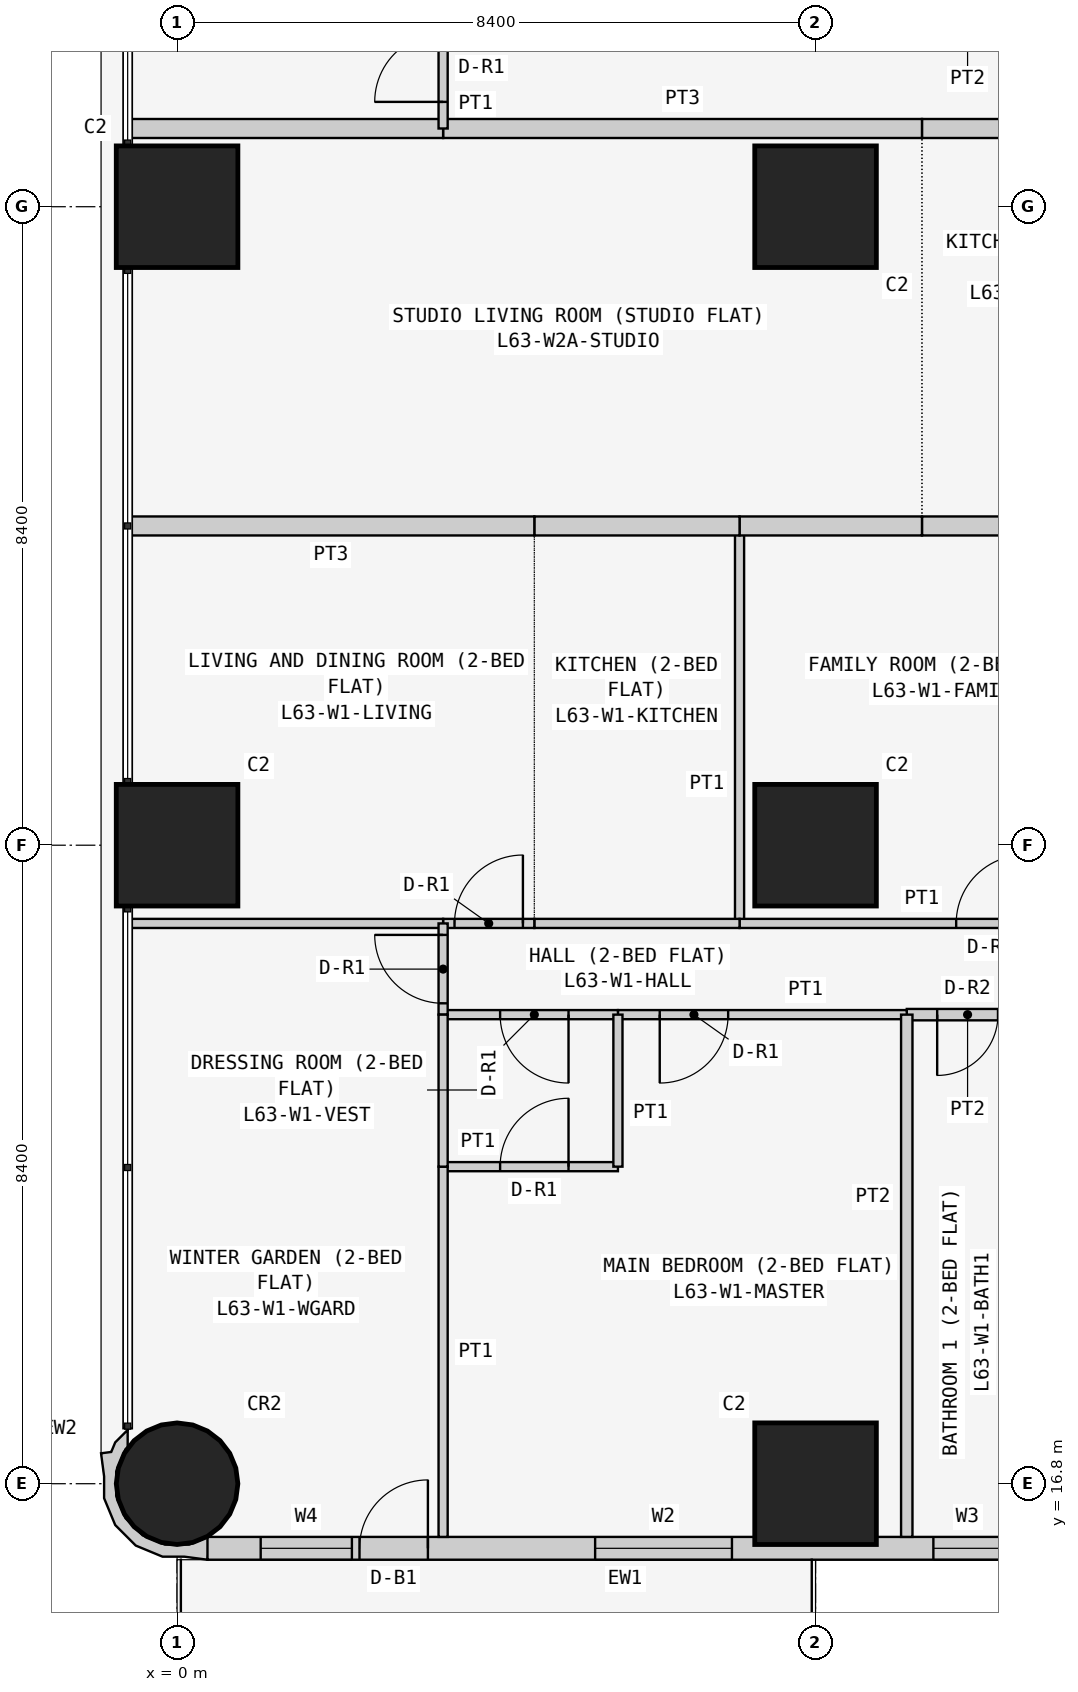
"""IFC4 building model, lengths in metres.
Left out: names, types, materials, properties, quantities, classifications, styles, units other than length and angle.
Written with IfcOpenShell. Run it as: python <this file> out.ifc"""

import sys

from ifc_helpers import new_model, si_unit, direction, frame, frame_2d, origin, origin_2d, place, context, subcontext, project, spatial, polyline, rectangle, circle, outline, extrude, element, fill, save


model = new_model("IFC4")
c1 = context("Model", 3, precision=1e-05, world=origin(), true_north=direction((0.0, 1.0)))
c2 = subcontext(c1, "Body", "Model", "MODEL_VIEW")
j1 = project(units=[si_unit("LENGTHUNIT", "METRE"), si_unit("PLANEANGLEUNIT", "RADIAN")], contexts=[c1])
p1 = place(None, origin())
s1 = spatial("IfcSite", under=j1, at=p1, CompositionType="ELEMENT")
p2 = place(p1, origin())
s2 = spatial("IfcBuilding", under=s1, at=p2, CompositionType="ELEMENT")
p3 = place(p2, frame((0.0, 0.0, 240.9)))
s3 = spatial("IfcBuildingStorey", under=s2, at=p3, CompositionType="ELEMENT", Elevation=240.9)
p4 = place(p3, frame((0.0, 16.8, 0.0), z_axis=(0.0, 0.0, 1.0), x_axis=(1.0, 0.0, 0.0)))
e1 = element("IfcColumn", 1, at=p4, inside=s3, PredefinedType="COLUMN", context=c2, shape_type="SweptSolid", body=[
    extrude(circle(Radius=0.8, at=origin_2d()), origin(), (0.0, 0.0, 1.0), 3.6),
])
for number, where, z_axis, x_axis in (
    (2, (0.0, 25.2, 0.0), (0.0, 0.0, 1.0), (1.0, 0.0, 0.0)),
    (3, (0.0, 33.6, 0.0), (0.0, 0.0, 1.0), (1.0, 0.0, 0.0)),
    (4, (8.4, 16.8, 0.0), (0.0, 0.0, 1.0), (1.0, 0.0, 0.0)),
    (5, (8.4, 25.2, 0.0), (0.0, 0.0, 1.0), (1.0, 0.0, 0.0)),
    (6, (8.4, 33.6, 0.0), (0.0, 0.0, 1.0), (1.0, 0.0, 0.0)),
):
    element("IfcColumn", number, at=place(p3, frame(where, z_axis=z_axis, x_axis=x_axis)), inside=s3, PredefinedType="COLUMN", context=c2, shape_type="SweptSolid", body=[
        extrude(rectangle(XDim=1.6, YDim=1.6, at=origin_2d()), origin(), (0.0, 0.0, 1.0), 3.6),
    ])
p5 = place(p3, frame((0.4, 15.95, 0.0), z_axis=(0.0, 0.0, 1.0), x_axis=(1.0, 0.0, 0.0)))
e7 = element("IfcWall", 7, at=p5, inside=s3, PredefinedType="SOLIDWALL", context=c2, shape_type="SweptSolid", body=[
    extrude(rectangle(XDim=15.7, YDim=0.3, at=frame_2d((7.85, 0.0))), origin(), (0.0, 0.0, 1.0), 3.45),
])
p6 = place(p5, frame((12.4, 0.0, 0.9)))
e8 = element("IfcOpeningElement", 8, at=p6, cuts=e7, PredefinedType="OPENING", context=c2, shape_type="SweptSolid", body=[
    extrude(rectangle(XDim=1.8, YDim=1.5, at=frame_2d((0.9, 0.75))), frame((0.0, 0.16, 0.0), z_axis=(0.0, -1.0, 0.0), x_axis=(1.0, 0.0, 0.0)), (0.0, 0.0, 1.0), 0.32),
])
p7 = place(p5, frame((9.55, 0.0, 1.5)))
e9 = element("IfcOpeningElement", 9, at=p7, cuts=e7, PredefinedType="OPENING", context=c2, shape_type="SweptSolid", body=[
    extrude(rectangle(XDim=0.9, YDim=0.7, at=frame_2d((0.45, 0.35))), frame((0.0, 0.16, 0.0), z_axis=(0.0, -1.0, 0.0), x_axis=(1.0, 0.0, 0.0)), (0.0, 0.0, 1.0), 0.32),
])
p8 = place(p5, frame((5.1, 0.0, 0.9)))
e10 = element("IfcOpeningElement", 10, at=p8, cuts=e7, PredefinedType="OPENING", context=c2, shape_type="SweptSolid", body=[
    extrude(rectangle(XDim=1.8, YDim=1.5, at=frame_2d((0.9, 0.75))), frame((0.0, 0.16, 0.0), z_axis=(0.0, -1.0, 0.0), x_axis=(1.0, 0.0, 0.0)), (0.0, 0.0, 1.0), 0.32),
])
p9 = place(p5, frame((2.0, 0.0, 0.0)))
e11 = element("IfcOpeningElement", 11, at=p9, cuts=e7, PredefinedType="OPENING", context=c2, shape_type="SweptSolid", body=[
    extrude(rectangle(XDim=0.9, YDim=2.4, at=frame_2d((0.45, 1.2))), frame((0.0, 0.16, 0.0), z_axis=(0.0, -1.0, 0.0), x_axis=(1.0, 0.0, 0.0)), (0.0, 0.0, 1.0), 0.32),
])
p10 = place(p5, frame((0.7, 0.0, 0.9)))
e12 = element("IfcOpeningElement", 12, at=p10, cuts=e7, PredefinedType="OPENING", context=c2, shape_type="SweptSolid", body=[
    extrude(rectangle(XDim=1.2, YDim=1.5, at=frame_2d((0.6, 0.75))), frame((0.0, 0.16, 0.0), z_axis=(0.0, -1.0, 0.0), x_axis=(1.0, 0.0, 0.0)), (0.0, 0.0, 1.0), 0.32),
])
p11 = place(p3, frame((-0.595, 17.448, 0.0), z_axis=(0.0, 0.0, 1.0), x_axis=(-0.93923434088, -0.343276641956, 0.0)))
e13 = element("IfcWall", 13, at=p11, inside=s3, PredefinedType="SOLIDWALL", context=c2, shape_type="SweptSolid", body=[
    extrude(outline(polyline([(-0.369, 1.89), (-0.509, 1.621), (-0.491, 1.614), (-0.479, 1.609), (-0.211, 1.62), (0.088, 1.511), (0.323, 1.295), (0.457, 1.006), (0.47, 0.688), (0.361, 0.389), (0.146, 0.154), (0.108, 0.137), (0.031, -0.075), (0.241, 0.023), (0.334, 0.124), (0.465, 0.094), (0.532, 0.393), (0.631, 0.663), (0.614, 1.045), (0.453, 1.391), (0.172, 1.649), (-0.098, 1.748), (-0.369, 1.89)])), origin(), (0.0, 0.0, 1.0), 3.45),
])
p12 = place(p3, frame((7.4, 29.4, 0.0), z_axis=(0.0, 0.0, 1.0), x_axis=(0.0, -1.0, 0.0)))
e14 = element("IfcWall", 14, at=p12, inside=s3, PredefinedType="PARTITIONING", context=c2, shape_type="SweptSolid", body=[
    extrude(rectangle(XDim=5.229, YDim=0.12, at=frame_2d((2.615, 0.0))), origin(), (0.0, 0.0, 1.0), 3.45),
])
p13 = place(p3, frame((7.4, 24.171, 0.0), z_axis=(0.0, 0.0, 1.0), x_axis=(1.0, 0.0, 0.0)))
e15 = element("IfcWall", 15, at=p13, inside=s3, PredefinedType="PARTITIONING", context=c2, shape_type="SweptSolid", body=[
    extrude(rectangle(XDim=4.8, YDim=0.12, at=frame_2d((2.4, 0.0))), origin(), (0.0, 0.0, 1.0), 3.45),
])
p14 = place(p13, frame((2.85, 0.0, 0.0)))
e16 = element("IfcOpeningElement", 16, at=p14, cuts=e15, PredefinedType="OPENING", context=c2, shape_type="SweptSolid", body=[
    extrude(rectangle(XDim=0.9, YDim=2.1, at=frame_2d((0.45, 1.05))), frame((0.0, 0.07, 0.0), z_axis=(0.0, -1.0, 0.0), x_axis=(1.0, 0.0, 0.0)), (0.0, 0.0, 1.0), 0.14),
])
p15 = place(p3, frame((12.2, 29.4, 0.0), z_axis=(0.0, 0.0, 1.0), x_axis=(-1.0, 0.0, 0.0)))
e17 = element("IfcWall", 17, at=p15, inside=s3, PredefinedType="PARTITIONING", context=c2, shape_type="SweptSolid", body=[
    extrude(rectangle(XDim=2.4, YDim=0.25, at=frame_2d((1.2, 0.0))), origin(), (0.0, 0.0, 1.0), 3.45),
])
p16 = place(p3, frame((9.8, 29.4, 0.0), z_axis=(0.0, 0.0, 1.0), x_axis=(-1.0, 0.0, 0.0)))
e18 = element("IfcWall", 18, at=p16, inside=s3, PredefinedType="PARTITIONING", context=c2, shape_type="SweptSolid", body=[
    extrude(rectangle(XDim=2.4, YDim=0.25, at=frame_2d((1.2, 0.0))), origin(), (0.0, 0.0, 1.0), 3.45),
])
p17 = place(p3, frame((4.7, 24.171, 0.0), z_axis=(0.0, 0.0, 1.0), x_axis=(1.0, 0.0, 0.0)))
e19 = element("IfcWall", 19, at=p17, inside=s3, PredefinedType="PARTITIONING", context=c2, shape_type="SweptSolid", body=[
    extrude(rectangle(XDim=2.7, YDim=0.12, at=frame_2d((1.35, 0.0))), origin(), (0.0, 0.0, 1.0), 3.45),
])
p18 = place(p3, frame((7.4, 29.4, 0.0), z_axis=(0.0, 0.0, 1.0), x_axis=(-1.0, 0.0, 0.0)))
e20 = element("IfcWall", 20, at=p18, inside=s3, PredefinedType="PARTITIONING", context=c2, shape_type="SweptSolid", body=[
    extrude(rectangle(XDim=2.7, YDim=0.25, at=frame_2d((1.35, 0.0))), origin(), (0.0, 0.0, 1.0), 3.45),
])
p19 = place(p3, frame((3.5, 24.171, 0.0), z_axis=(0.0, 0.0, 1.0), x_axis=(1.0, 0.0, 0.0)))
e21 = element("IfcWall", 21, at=p19, inside=s3, PredefinedType="PARTITIONING", context=c2, shape_type="SweptSolid", body=[
    extrude(rectangle(XDim=1.2, YDim=0.12, at=frame_2d((0.6, 0.0))), origin(), (0.0, 0.0, 1.0), 3.45),
])
p20 = place(p19, frame((0.15, 0.0, 0.0)))
e22 = element("IfcOpeningElement", 22, at=p20, cuts=e21, PredefinedType="OPENING", context=c2, shape_type="SweptSolid", body=[
    extrude(rectangle(XDim=0.9, YDim=2.1, at=frame_2d((0.45, 1.05))), frame((0.0, 0.07, 0.0), z_axis=(0.0, -1.0, 0.0), x_axis=(1.0, 0.0, 0.0)), (0.0, 0.0, 1.0), 0.14),
])
p21 = place(p3, frame((-0.65, 24.171, 0.0), z_axis=(0.0, 0.0, 1.0), x_axis=(1.0, 0.0, 0.0)))
e23 = element("IfcWall", 23, at=p21, inside=s3, PredefinedType="PARTITIONING", context=c2, shape_type="SweptSolid", body=[
    extrude(rectangle(XDim=4.15, YDim=0.12, at=frame_2d((2.075, 0.0))), origin(), (0.0, 0.0, 1.0), 3.45),
])
p22 = place(p3, frame((4.7, 29.4, 0.0), z_axis=(0.0, 0.0, 1.0), x_axis=(-1.0, 0.0, 0.0)))
e24 = element("IfcWall", 24, at=p22, inside=s3, PredefinedType="PARTITIONING", context=c2, shape_type="SweptSolid", body=[
    extrude(rectangle(XDim=5.35, YDim=0.25, at=frame_2d((2.675, 0.0))), origin(), (0.0, 0.0, 1.0), 3.45),
])
p23 = place(p3, frame((9.6, 22.971, 0.0), z_axis=(0.0, 0.0, 1.0), x_axis=(1.0, 0.0, 0.0)))
e25 = element("IfcWall", 25, at=p23, inside=s3, PredefinedType="PARTITIONING", context=c2, shape_type="SweptSolid", body=[
    extrude(rectangle(XDim=1.6, YDim=0.15, at=frame_2d((0.8, 0.0))), origin(), (0.0, 0.0, 1.0), 3.45),
])
p24 = place(p23, frame((0.4, 0.0, 0.0)))
e26 = element("IfcOpeningElement", 26, at=p24, cuts=e25, PredefinedType="OPENING", context=c2, shape_type="SweptSolid", body=[
    extrude(rectangle(XDim=0.8, YDim=2.1, at=frame_2d((0.4, 1.05))), frame((0.0, 0.085, 0.0), z_axis=(0.0, -1.0, 0.0), x_axis=(1.0, 0.0, 0.0)), (0.0, 0.0, 1.0), 0.17),
])
p25 = place(p3, frame((5.8, 22.971, 0.0), z_axis=(0.0, 0.0, 1.0), x_axis=(1.0, 0.0, 0.0)))
e27 = element("IfcWall", 27, at=p25, inside=s3, PredefinedType="PARTITIONING", context=c2, shape_type="SweptSolid", body=[
    extrude(rectangle(XDim=3.8, YDim=0.12, at=frame_2d((1.9, 0.0))), origin(), (0.0, 0.0, 1.0), 3.45),
])
p26 = place(p25, frame((0.55, 0.0, 0.0)))
e28 = element("IfcOpeningElement", 28, at=p26, cuts=e27, PredefinedType="OPENING", context=c2, shape_type="SweptSolid", body=[
    extrude(rectangle(XDim=0.9, YDim=2.1, at=frame_2d((0.45, 1.05))), frame((0.0, 0.07, 0.0), z_axis=(0.0, -1.0, 0.0), x_axis=(1.0, 0.0, 0.0)), (0.0, 0.0, 1.0), 0.14),
])
p27 = place(p3, frame((3.5, 22.971, 0.0), z_axis=(0.0, 0.0, 1.0), x_axis=(1.0, 0.0, 0.0)))
e29 = element("IfcWall", 29, at=p27, inside=s3, PredefinedType="PARTITIONING", context=c2, shape_type="SweptSolid", body=[
    extrude(rectangle(XDim=2.3, YDim=0.12, at=frame_2d((1.15, 0.0))), origin(), (0.0, 0.0, 1.0), 3.45),
])
p28 = place(p27, frame((0.75, 0.0, 0.0)))
e30 = element("IfcOpeningElement", 30, at=p28, cuts=e29, PredefinedType="OPENING", context=c2, shape_type="SweptSolid", body=[
    extrude(rectangle(XDim=0.9, YDim=2.1, at=frame_2d((0.45, 1.05))), frame((0.0, 0.07, 0.0), z_axis=(0.0, -1.0, 0.0), x_axis=(1.0, 0.0, 0.0)), (0.0, 0.0, 1.0), 0.14),
])
p29 = place(p3, frame((3.5, 24.171, 0.0), z_axis=(0.0, 0.0, 1.0), x_axis=(0.0, -1.0, 0.0)))
e31 = element("IfcWall", 31, at=p29, inside=s3, PredefinedType="PARTITIONING", context=c2, shape_type="SweptSolid", body=[
    extrude(rectangle(XDim=1.2, YDim=0.12, at=frame_2d((0.6, 0.0))), origin(), (0.0, 0.0, 1.0), 3.45),
])
p30 = place(p29, frame((0.151, 0.0, 0.0)))
e32 = element("IfcOpeningElement", 32, at=p30, cuts=e31, PredefinedType="OPENING", context=c2, shape_type="SweptSolid", body=[
    extrude(rectangle(XDim=0.9, YDim=2.1, at=frame_2d((0.45, 1.05))), frame((0.0, 0.07, 0.0), z_axis=(0.0, -1.0, 0.0), x_axis=(1.0, 0.0, 0.0)), (0.0, 0.0, 1.0), 0.14),
])
p31 = place(p3, frame((9.6, 22.971, 0.0), z_axis=(0.0, 0.0, 1.0), x_axis=(0.0, -1.0, 0.0)))
e33 = element("IfcWall", 33, at=p31, inside=s3, PredefinedType="PARTITIONING", context=c2, shape_type="SweptSolid", body=[
    extrude(rectangle(XDim=6.871, YDim=0.15, at=frame_2d((3.436, 0.0))), origin(), (0.0, 0.0, 1.0), 3.45),
])
p32 = place(p3, frame((3.5, 20.971, 0.0), z_axis=(0.0, 0.0, 1.0), x_axis=(1.0, 0.0, 0.0)))
e34 = element("IfcWall", 34, at=p32, inside=s3, PredefinedType="PARTITIONING", context=c2, shape_type="SweptSolid", body=[
    extrude(rectangle(XDim=2.3, YDim=0.12, at=frame_2d((1.15, 0.0))), origin(), (0.0, 0.0, 1.0), 3.45),
])
p33 = place(p32, frame((0.75, 0.0, 0.0)))
e35 = element("IfcOpeningElement", 35, at=p33, cuts=e34, PredefinedType="OPENING", context=c2, shape_type="SweptSolid", body=[
    extrude(rectangle(XDim=0.9, YDim=2.1, at=frame_2d((0.45, 1.05))), frame((0.0, 0.07, 0.0), z_axis=(0.0, -1.0, 0.0), x_axis=(1.0, 0.0, 0.0)), (0.0, 0.0, 1.0), 0.14),
])
p34 = place(p3, frame((5.8, 20.971, 0.0), z_axis=(0.0, 0.0, 1.0), x_axis=(0.0, 1.0, 0.0)))
e36 = element("IfcWall", 36, at=p34, inside=s3, PredefinedType="PARTITIONING", context=c2, shape_type="SweptSolid", body=[
    extrude(rectangle(XDim=2.0, YDim=0.12, at=frame_2d((1.0, 0.0))), origin(), (0.0, 0.0, 1.0), 3.45),
])
p35 = place(p3, frame((3.5, 16.1, 0.0), z_axis=(0.0, 0.0, 1.0), x_axis=(0.0, 1.0, 0.0)))
e37 = element("IfcWall", 37, at=p35, inside=s3, PredefinedType="PARTITIONING", context=c2, shape_type="SweptSolid", body=[
    extrude(rectangle(XDim=4.871, YDim=0.12, at=frame_2d((2.436, 0.0))), origin(), (0.0, 0.0, 1.0), 3.45),
])
p36 = place(p3, frame((3.5, 22.971, 0.0), z_axis=(0.0, 0.0, 1.0), x_axis=(0.0, -1.0, 0.0)))
e38 = element("IfcWall", 38, at=p36, inside=s3, PredefinedType="PARTITIONING", context=c2, shape_type="SweptSolid", body=[
    extrude(rectangle(XDim=2.0, YDim=0.12, at=frame_2d((1.0, 0.0))), origin(), (0.0, 0.0, 1.0), 3.45),
])
p37 = place(p3, frame((9.8, 34.629, 0.0), z_axis=(0.0, 0.0, 1.0), x_axis=(1.0, 0.0, 0.0)))
e39 = element("IfcWall", 39, at=p37, inside=s3, PredefinedType="PARTITIONING", context=c2, shape_type="SweptSolid", body=[
    extrude(rectangle(XDim=3.6, YDim=0.25, at=frame_2d((1.8, 0.0))), origin(), (0.0, 0.0, 1.0), 3.45),
])
p38 = place(p3, frame((3.5, 34.629, 0.0), z_axis=(0.0, 0.0, 1.0), x_axis=(1.0, 0.0, 0.0)))
e40 = element("IfcWall", 40, at=p38, inside=s3, PredefinedType="PARTITIONING", context=c2, shape_type="SweptSolid", body=[
    extrude(rectangle(XDim=6.3, YDim=0.25, at=frame_2d((3.15, 0.0))), origin(), (0.0, 0.0, 1.0), 3.45),
])
p39 = place(p3, frame((-0.65, 34.629, 0.0), z_axis=(0.0, 0.0, 1.0), x_axis=(1.0, 0.0, 0.0)))
e41 = element("IfcWall", 41, at=p39, inside=s3, PredefinedType="PARTITIONING", context=c2, shape_type="SweptSolid", body=[
    extrude(rectangle(XDim=4.15, YDim=0.25, at=frame_2d((2.075, 0.0))), origin(), (0.0, 0.0, 1.0), 3.45),
])
p40 = place(p3, frame((3.5, 34.629, 0.0), z_axis=(0.0, 0.0, 1.0), x_axis=(0.0, 1.0, 0.0)))
e42 = element("IfcWall", 42, at=p40, inside=s3, PredefinedType="PARTITIONING", context=c2, shape_type="SweptSolid", body=[
    extrude(rectangle(XDim=1.6, YDim=0.12, at=frame_2d((0.8, 0.0))), origin(), (0.0, 0.0, 1.0), 3.45),
])
p41 = place(p40, frame((0.35, 0.0, 0.0)))
e43 = element("IfcOpeningElement", 43, at=p41, cuts=e42, PredefinedType="OPENING", context=c2, shape_type="SweptSolid", body=[
    extrude(rectangle(XDim=0.9, YDim=2.1, at=frame_2d((0.45, 1.05))), frame((0.0, 0.07, 0.0), z_axis=(0.0, -1.0, 0.0), x_axis=(1.0, 0.0, 0.0)), (0.0, 0.0, 1.0), 0.14),
])
p42 = place(p7, origin())
e44 = element("IfcWindow", 44, at=p42, inside=s3, PartitioningType="SINGLE_PANEL", PredefinedType="WINDOW", context=c2, shape_type="SweptSolid", body=[
    extrude(rectangle(XDim=0.9, YDim=0.7, at=frame_2d((0.45, 0.35))), frame((0.0, 0.03, 0.0), z_axis=(0.0, -1.0, 0.0), x_axis=(1.0, 0.0, 0.0)), (0.0, 0.0, 1.0), 0.06),
])
fill(e9, e44)
p43 = place(p8, origin())
e45 = element("IfcWindow", 45, at=p43, inside=s3, PartitioningType="SINGLE_PANEL", PredefinedType="WINDOW", context=c2, shape_type="SweptSolid", body=[
    extrude(rectangle(XDim=1.8, YDim=1.5, at=frame_2d((0.9, 0.75))), frame((0.0, 0.03, 0.0), z_axis=(0.0, -1.0, 0.0), x_axis=(1.0, 0.0, 0.0)), (0.0, 0.0, 1.0), 0.06),
])
fill(e10, e45)
p44 = place(p9, origin())
e46 = element("IfcDoor", 46, at=p44, inside=s3, OperationType="SINGLE_SWING_RIGHT", PredefinedType="DOOR", context=c2, shape_type="SweptSolid", body=[
    extrude(rectangle(XDim=0.9, YDim=2.4, at=frame_2d((0.45, 1.2))), frame((0.0, 0.025, 0.0), z_axis=(0.0, -1.0, 0.0), x_axis=(1.0, 0.0, 0.0)), (0.0, 0.0, 1.0), 0.05),
])
fill(e11, e46)
p45 = place(p10, origin())
e47 = element("IfcWindow", 47, at=p45, inside=s3, PartitioningType="SINGLE_PANEL", PredefinedType="WINDOW", context=c2, shape_type="SweptSolid", body=[
    extrude(rectangle(XDim=1.2, YDim=1.5, at=frame_2d((0.6, 0.75))), frame((0.0, 0.03, 0.0), z_axis=(0.0, -1.0, 0.0), x_axis=(1.0, 0.0, 0.0)), (0.0, 0.0, 1.0), 0.06),
])
fill(e12, e47)
p46 = place(p14, origin())
e48 = element("IfcDoor", 48, at=p46, inside=s3, OperationType="SINGLE_SWING_RIGHT", PredefinedType="DOOR", context=c2, shape_type="SweptSolid", body=[
    extrude(rectangle(XDim=0.9, YDim=2.1, at=frame_2d((0.45, 1.05))), frame((0.0, 0.025, 0.0), z_axis=(0.0, -1.0, 0.0), x_axis=(1.0, 0.0, 0.0)), (0.0, 0.0, 1.0), 0.05),
])
fill(e16, e48)
p47 = place(p20, origin())
e49 = element("IfcDoor", 49, at=p47, inside=s3, OperationType="SINGLE_SWING_RIGHT", PredefinedType="DOOR", context=c2, shape_type="SweptSolid", body=[
    extrude(rectangle(XDim=0.9, YDim=2.1, at=frame_2d((0.45, 1.05))), frame((0.0, 0.025, 0.0), z_axis=(0.0, -1.0, 0.0), x_axis=(1.0, 0.0, 0.0)), (0.0, 0.0, 1.0), 0.05),
])
fill(e22, e49)
p48 = place(p24, frame((0.8, 0.0, 0.0), z_axis=(0.0, 0.0, 1.0), x_axis=(-1.0, 0.0, 0.0)))
e50 = element("IfcDoor", 50, at=p48, inside=s3, OperationType="SINGLE_SWING_RIGHT", PredefinedType="DOOR", context=c2, shape_type="SweptSolid", body=[
    extrude(rectangle(XDim=0.8, YDim=2.1, at=frame_2d((0.4, 1.05))), frame((0.0, 0.025, 0.0), z_axis=(0.0, -1.0, 0.0), x_axis=(1.0, 0.0, 0.0)), (0.0, 0.0, 1.0), 0.05),
])
fill(e26, e50)
p49 = place(p26, frame((0.9, 0.0, 0.0), z_axis=(0.0, 0.0, 1.0), x_axis=(-1.0, 0.0, 0.0)))
e51 = element("IfcDoor", 51, at=p49, inside=s3, OperationType="SINGLE_SWING_RIGHT", PredefinedType="DOOR", context=c2, shape_type="SweptSolid", body=[
    extrude(rectangle(XDim=0.9, YDim=2.1, at=frame_2d((0.45, 1.05))), frame((0.0, 0.025, 0.0), z_axis=(0.0, -1.0, 0.0), x_axis=(1.0, 0.0, 0.0)), (0.0, 0.0, 1.0), 0.05),
])
fill(e28, e51)
p50 = place(p28, frame((0.9, 0.0, 0.0), z_axis=(0.0, 0.0, 1.0), x_axis=(-1.0, 0.0, 0.0)))
e52 = element("IfcDoor", 52, at=p50, inside=s3, OperationType="SINGLE_SWING_LEFT", PredefinedType="DOOR", context=c2, shape_type="SweptSolid", body=[
    extrude(rectangle(XDim=0.9, YDim=2.1, at=frame_2d((0.45, 1.05))), frame((0.0, 0.025, 0.0), z_axis=(0.0, -1.0, 0.0), x_axis=(1.0, 0.0, 0.0)), (0.0, 0.0, 1.0), 0.05),
])
fill(e30, e52)
p51 = place(p33, origin())
e53 = element("IfcDoor", 53, at=p51, inside=s3, OperationType="SINGLE_SWING_RIGHT", PredefinedType="DOOR", context=c2, shape_type="SweptSolid", body=[
    extrude(rectangle(XDim=0.9, YDim=2.1, at=frame_2d((0.45, 1.05))), frame((0.0, 0.025, 0.0), z_axis=(0.0, -1.0, 0.0), x_axis=(1.0, 0.0, 0.0)), (0.0, 0.0, 1.0), 0.05),
])
fill(e35, e53)
p52 = place(p30, frame((0.9, 0.0, 0.0), z_axis=(0.0, 0.0, 1.0), x_axis=(-1.0, 0.0, 0.0)))
e54 = element("IfcDoor", 54, at=p52, inside=s3, OperationType="SINGLE_SWING_RIGHT", PredefinedType="DOOR", context=c2, shape_type="SweptSolid", body=[
    extrude(rectangle(XDim=0.9, YDim=2.1, at=frame_2d((0.45, 1.05))), frame((0.0, 0.025, 0.0), z_axis=(0.0, -1.0, 0.0), x_axis=(1.0, 0.0, 0.0)), (0.0, 0.0, 1.0), 0.05),
])
fill(e32, e54)
p53 = place(p41, origin())
e55 = element("IfcDoor", 55, at=p53, inside=s3, OperationType="SINGLE_SWING_LEFT", PredefinedType="DOOR", context=c2, shape_type="SweptSolid", body=[
    extrude(rectangle(XDim=0.9, YDim=2.1, at=frame_2d((0.45, 1.05))), frame((0.0, 0.025, 0.0), z_axis=(0.0, -1.0, 0.0), x_axis=(1.0, 0.0, 0.0)), (0.0, 0.0, 1.0), 0.05),
])
fill(e43, e55)
save(model, sys.argv[1])
